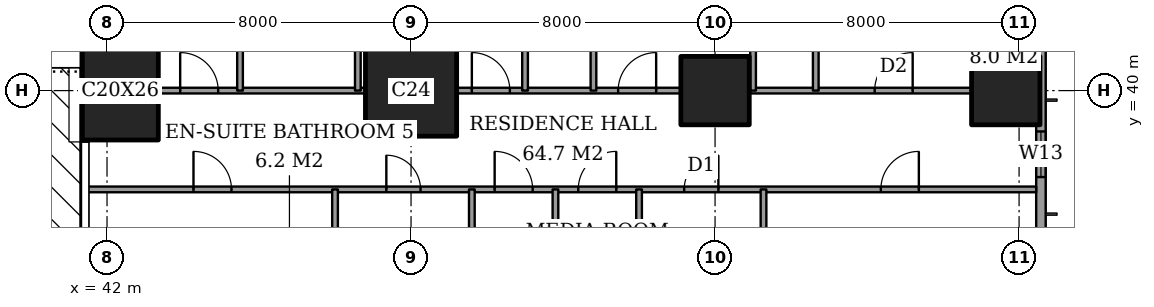
"""IFC4 building model, lengths in metres.
Left out: names, types, materials, properties, quantities, classifications, styles, units other than length and angle.
Written with IfcOpenShell. Run it as: python <this file> out.ifc"""

import sys

from ifc_helpers import new_model, si_unit, direction, frame, frame_2d, origin, origin_2d, place, context, subcontext, project, spatial, rectangle, extrude, element, fill, save


model = new_model("IFC4")
c1 = context("Model", 3, precision=1e-05, world=origin(), true_north=direction((0.0, 1.0)))
c2 = subcontext(c1, "Body", "Model", "MODEL_VIEW")
j1 = project(units=[si_unit("LENGTHUNIT", "METRE"), si_unit("PLANEANGLEUNIT", "RADIAN")], contexts=[c1])
p1 = place(None, origin())
s1 = spatial("IfcSite", under=j1, at=p1, CompositionType="ELEMENT")
p2 = place(p1, origin())
s2 = spatial("IfcBuilding", under=s1, at=p2, CompositionType="ELEMENT")
p3 = place(p2, frame((0.0, 0.0, 182.2)))
s3 = spatial("IfcBuildingStorey", under=s2, at=p3, CompositionType="ELEMENT", Elevation=182.2)
p4 = place(p3, frame((42.35, 40.0, 0.0), z_axis=(0.0, 0.0, 1.0), x_axis=(1.0, 0.0, 0.0)))
e1 = element("IfcColumn", 1, at=p4, inside=s3, PredefinedType="COLUMN", context=c2, shape_type="SweptSolid", body=[
    extrude(rectangle(XDim=2.0, YDim=2.6, at=origin_2d()), origin(), (0.0, 0.0, 1.0), 3.6),
])
p5 = place(p3, frame((50.0, 40.0, 0.0), z_axis=(0.0, 0.0, 1.0), x_axis=(1.0, 0.0, 0.0)))
e2 = element("IfcColumn", 2, at=p5, inside=s3, PredefinedType="COLUMN", context=c2, shape_type="SweptSolid", body=[
    extrude(rectangle(XDim=2.4, YDim=2.4, at=origin_2d()), origin(), (0.0, 0.0, 1.0), 3.6),
])
for number, where, z_axis, x_axis in (
    (3, (58.0, 40.0, 0.0), (0.0, 0.0, 1.0), (1.0, 0.0, 0.0)),
    (4, (65.65, 40.0, 0.0), (0.0, 0.0, 1.0), (1.0, 0.0, 0.0)),
):
    element("IfcColumn", number, at=place(p3, frame(where, z_axis=z_axis, x_axis=x_axis)), inside=s3, PredefinedType="COLUMN", context=c2, shape_type="SweptSolid", body=[
        extrude(rectangle(XDim=1.8, YDim=1.8, at=origin_2d()), origin(), (0.0, 0.0, 1.0), 3.6),
    ])
p6 = place(p3, frame((66.575, 3.175, 0.0), z_axis=(0.0, 0.0, 1.0), x_axis=(0.0, 1.0, 0.0)))
e5 = element("IfcWall", 5, at=p6, inside=s3, PredefinedType="SOLIDWALL", context=c2, shape_type="SweptSolid", body=[
    extrude(rectangle(XDim=41.65, YDim=0.25, at=frame_2d((20.825, 0.0))), origin(), (0.0, 0.0, 1.0), 3.6),
])
p7 = place(p6, frame((0.825, 0.0, 0.2)))
e6 = element("IfcOpeningElement", 6, at=p7, cuts=e5, PredefinedType="OPENING", context=c2, shape_type="SweptSolid", body=[
    extrude(rectangle(XDim=2.4, YDim=2.4, at=frame_2d((1.2, 1.2))), frame((0.0, 0.135, 0.0), z_axis=(0.0, -1.0, 0.0), x_axis=(1.0, 0.0, 0.0)), (0.0, 0.0, 1.0), 0.27),
])
p8 = place(p6, frame((6.6, 0.0, 0.2)))
e7 = element("IfcOpeningElement", 7, at=p8, cuts=e5, PredefinedType="OPENING", context=c2, shape_type="SweptSolid", body=[
    extrude(rectangle(XDim=1.2, YDim=2.4, at=frame_2d((0.6, 1.2))), frame((0.0, 0.135, 0.0), z_axis=(0.0, -1.0, 0.0), x_axis=(1.0, 0.0, 0.0)), (0.0, 0.0, 1.0), 0.27),
])
p9 = place(p6, frame((8.775, 0.0, 0.2)))
e8 = element("IfcOpeningElement", 8, at=p9, cuts=e5, PredefinedType="OPENING", context=c2, shape_type="SweptSolid", body=[
    extrude(rectangle(XDim=2.4, YDim=2.4, at=frame_2d((1.2, 1.2))), frame((0.0, 0.135, 0.0), z_axis=(0.0, -1.0, 0.0), x_axis=(1.0, 0.0, 0.0)), (0.0, 0.0, 1.0), 0.27),
])
p10 = place(p6, frame((15.675, 0.0, 0.2)))
e9 = element("IfcOpeningElement", 9, at=p10, cuts=e5, PredefinedType="OPENING", context=c2, shape_type="SweptSolid", body=[
    extrude(rectangle(XDim=2.4, YDim=2.4, at=frame_2d((1.2, 1.2))), frame((0.0, 0.135, 0.0), z_axis=(0.0, -1.0, 0.0), x_axis=(1.0, 0.0, 0.0)), (0.0, 0.0, 1.0), 0.27),
])
p11 = place(p6, frame((23.575, 0.0, 0.2)))
e10 = element("IfcOpeningElement", 10, at=p11, cuts=e5, PredefinedType="OPENING", context=c2, shape_type="SweptSolid", body=[
    extrude(rectangle(XDim=2.4, YDim=2.4, at=frame_2d((1.2, 1.2))), frame((0.0, 0.135, 0.0), z_axis=(0.0, -1.0, 0.0), x_axis=(1.0, 0.0, 0.0)), (0.0, 0.0, 1.0), 0.27),
])
p12 = place(p6, frame((30.775, 0.0, 0.2)))
e11 = element("IfcOpeningElement", 11, at=p12, cuts=e5, PredefinedType="OPENING", context=c2, shape_type="SweptSolid", body=[
    extrude(rectangle(XDim=2.4, YDim=2.4, at=frame_2d((1.2, 1.2))), frame((0.0, 0.135, 0.0), z_axis=(0.0, -1.0, 0.0), x_axis=(1.0, 0.0, 0.0)), (0.0, 0.0, 1.0), 0.27),
])
p13 = place(p6, frame((34.55, 0.0, 0.2)))
e12 = element("IfcOpeningElement", 12, at=p13, cuts=e5, PredefinedType="OPENING", context=c2, shape_type="SweptSolid", body=[
    extrude(rectangle(XDim=1.2, YDim=2.4, at=frame_2d((0.6, 1.2))), frame((0.0, 0.135, 0.0), z_axis=(0.0, -1.0, 0.0), x_axis=(1.0, 0.0, 0.0)), (0.0, 0.0, 1.0), 0.27),
])
p14 = place(p6, frame((38.425, 0.0, 0.2)))
e13 = element("IfcOpeningElement", 13, at=p14, cuts=e5, PredefinedType="OPENING", context=c2, shape_type="SweptSolid", body=[
    extrude(rectangle(XDim=2.4, YDim=2.4, at=frame_2d((1.2, 1.2))), frame((0.0, 0.135, 0.0), z_axis=(0.0, -1.0, 0.0), x_axis=(1.0, 0.0, 0.0)), (0.0, 0.0, 1.0), 0.27),
])
p15 = place(p3, frame((41.439, 37.4, 0.0), z_axis=(0.0, 0.0, 1.0), x_axis=(1.0, 0.0, 0.0)))
e14 = element("IfcWall", 14, at=p15, inside=s3, PredefinedType="PARTITIONING", context=c2, shape_type="SweptSolid", body=[
    extrude(rectangle(XDim=25.011, YDim=0.15, at=frame_2d((12.505, 0.0))), origin(), (0.0, 0.0, 1.0), 3.35),
])
p16 = place(p15, frame((10.761, 0.0, 0.0)))
e15 = element("IfcOpeningElement", 15, at=p16, cuts=e14, PredefinedType="OPENING", context=c2, shape_type="SweptSolid", body=[
    extrude(rectangle(XDim=1.0, YDim=2.1, at=frame_2d((0.5, 1.05))), frame((0.0, 0.085, 0.0), z_axis=(0.0, -1.0, 0.0), x_axis=(1.0, 0.0, 0.0)), (0.0, 0.0, 1.0), 0.17),
])
p17 = place(p15, frame((20.924, 0.0, 0.0)))
e16 = element("IfcOpeningElement", 16, at=p17, cuts=e14, PredefinedType="OPENING", context=c2, shape_type="SweptSolid", body=[
    extrude(rectangle(XDim=1.0, YDim=2.1, at=frame_2d((0.5, 1.05))), frame((0.0, 0.085, 0.0), z_axis=(0.0, -1.0, 0.0), x_axis=(1.0, 0.0, 0.0)), (0.0, 0.0, 1.0), 0.17),
])
p18 = place(p15, frame((15.749, 0.0, 0.0)))
e17 = element("IfcOpeningElement", 17, at=p18, cuts=e14, PredefinedType="OPENING", context=c2, shape_type="SweptSolid", body=[
    extrude(rectangle(XDim=0.9, YDim=2.1, at=frame_2d((0.45, 1.05))), frame((0.0, 0.085, 0.0), z_axis=(0.0, -1.0, 0.0), x_axis=(1.0, 0.0, 0.0)), (0.0, 0.0, 1.0), 0.17),
])
p19 = place(p15, frame((12.961, 0.0, 0.0)))
e18 = element("IfcOpeningElement", 18, at=p19, cuts=e14, PredefinedType="OPENING", context=c2, shape_type="SweptSolid", body=[
    extrude(rectangle(XDim=1.0, YDim=2.1, at=frame_2d((0.5, 1.05))), frame((0.0, 0.085, 0.0), z_axis=(0.0, -1.0, 0.0), x_axis=(1.0, 0.0, 0.0)), (0.0, 0.0, 1.0), 0.17),
])
p20 = place(p15, frame((7.911, 0.0, 0.0)))
e19 = element("IfcOpeningElement", 19, at=p20, cuts=e14, PredefinedType="OPENING", context=c2, shape_type="SweptSolid", body=[
    extrude(rectangle(XDim=0.9, YDim=2.1, at=frame_2d((0.45, 1.05))), frame((0.0, 0.085, 0.0), z_axis=(0.0, -1.0, 0.0), x_axis=(1.0, 0.0, 0.0)), (0.0, 0.0, 1.0), 0.17),
])
p21 = place(p15, frame((2.836, 0.0, 0.0)))
e20 = element("IfcOpeningElement", 20, at=p21, cuts=e14, PredefinedType="OPENING", context=c2, shape_type="SweptSolid", body=[
    extrude(rectangle(XDim=1.0, YDim=2.1, at=frame_2d((0.5, 1.05))), frame((0.0, 0.085, 0.0), z_axis=(0.0, -1.0, 0.0), x_axis=(1.0, 0.0, 0.0)), (0.0, 0.0, 1.0), 0.17),
])
p22 = place(p3, frame((43.35, 40.0, 0.0), z_axis=(0.0, 0.0, 1.0), x_axis=(1.0, 0.0, 0.0)))
e21 = element("IfcWall", 21, at=p22, inside=s3, PredefinedType="PARTITIONING", context=c2, shape_type="SweptSolid", body=[
    extrude(rectangle(XDim=5.45, YDim=0.15, at=frame_2d((2.725, 0.0))), origin(), (0.0, 0.0, 1.0), 3.35),
])
p23 = place(p22, frame((0.575, 0.0, 0.0)))
e22 = element("IfcOpeningElement", 22, at=p23, cuts=e21, PredefinedType="OPENING", context=c2, shape_type="SweptSolid", body=[
    extrude(rectangle(XDim=1.0, YDim=2.1, at=frame_2d((0.5, 1.05))), frame((0.0, 0.085, 0.0), z_axis=(0.0, -1.0, 0.0), x_axis=(1.0, 0.0, 0.0)), (0.0, 0.0, 1.0), 0.17),
])
p24 = place(p3, frame((51.2, 40.0, 0.0), z_axis=(0.0, 0.0, 1.0), x_axis=(1.0, 0.0, 0.0)))
e23 = element("IfcWall", 23, at=p24, inside=s3, PredefinedType="PARTITIONING", context=c2, shape_type="SweptSolid", body=[
    extrude(rectangle(XDim=5.9, YDim=0.15, at=frame_2d((2.95, 0.0))), origin(), (0.0, 0.0, 1.0), 3.35),
])
p25 = place(p24, frame((4.25, 0.0, 0.0)))
e24 = element("IfcOpeningElement", 24, at=p25, cuts=e23, PredefinedType="OPENING", context=c2, shape_type="SweptSolid", body=[
    extrude(rectangle(XDim=1.0, YDim=2.1, at=frame_2d((0.5, 1.05))), frame((0.0, 0.085, 0.0), z_axis=(0.0, -1.0, 0.0), x_axis=(1.0, 0.0, 0.0)), (0.0, 0.0, 1.0), 0.17),
])
p26 = place(p24, frame((0.4, 0.0, 0.0)))
e25 = element("IfcOpeningElement", 25, at=p26, cuts=e23, PredefinedType="OPENING", context=c2, shape_type="SweptSolid", body=[
    extrude(rectangle(XDim=1.0, YDim=2.1, at=frame_2d((0.5, 1.05))), frame((0.0, 0.085, 0.0), z_axis=(0.0, -1.0, 0.0), x_axis=(1.0, 0.0, 0.0)), (0.0, 0.0, 1.0), 0.17),
])
p27 = place(p3, frame((58.9, 40.0, 0.0), z_axis=(0.0, 0.0, 1.0), x_axis=(1.0, 0.0, 0.0)))
e26 = element("IfcWall", 26, at=p27, inside=s3, PredefinedType="PARTITIONING", context=c2, shape_type="SweptSolid", body=[
    extrude(rectangle(XDim=5.85, YDim=0.15, at=frame_2d((2.925, 0.0))), origin(), (0.0, 0.0, 1.0), 3.35),
])
p28 = place(p27, frame((3.3, 0.0, 0.0)))
e27 = element("IfcOpeningElement", 27, at=p28, cuts=e26, PredefinedType="OPENING", context=c2, shape_type="SweptSolid", body=[
    extrude(rectangle(XDim=1.0, YDim=2.1, at=frame_2d((0.5, 1.05))), frame((0.0, 0.085, 0.0), z_axis=(0.0, -1.0, 0.0), x_axis=(1.0, 0.0, 0.0)), (0.0, 0.0, 1.0), 0.17),
])
p29 = place(p3, frame((45.5, 40.0, 0.0), z_axis=(0.0, 0.0, 1.0), x_axis=(0.0, 1.0, 0.0)))
e28 = element("IfcWall", 28, at=p29, inside=s3, PredefinedType="PARTITIONING", context=c2, shape_type="SweptSolid", body=[
    extrude(rectangle(XDim=8.45, YDim=0.15, at=frame_2d((4.225, 0.0))), origin(), (0.0, 0.0, 1.0), 3.35),
])
p30 = place(p3, frame((48.0, 28.0, 0.0), z_axis=(0.0, 0.0, 1.0), x_axis=(0.0, 1.0, 0.0)))
e29 = element("IfcWall", 29, at=p30, inside=s3, PredefinedType="PARTITIONING", context=c2, shape_type="SweptSolid", body=[
    extrude(rectangle(XDim=9.4, YDim=0.15, at=frame_2d((4.7, 0.0))), origin(), (0.0, 0.0, 1.0), 3.35),
])
p31 = place(p30, frame((0.5, 0.0, 0.0)))
e30 = element("IfcOpeningElement", 30, at=p31, cuts=e29, PredefinedType="OPENING", context=c2, shape_type="SweptSolid", body=[
    extrude(rectangle(XDim=1.0, YDim=2.1, at=frame_2d((0.5, 1.05))), frame((0.0, 0.085, 0.0), z_axis=(0.0, -1.0, 0.0), x_axis=(1.0, 0.0, 0.0)), (0.0, 0.0, 1.0), 0.17),
])
p32 = place(p3, frame((48.6, 40.0, 0.0), z_axis=(0.0, 0.0, 1.0), x_axis=(0.0, 1.0, 0.0)))
e31 = element("IfcWall", 31, at=p32, inside=s3, PredefinedType="PARTITIONING", context=c2, shape_type="SweptSolid", body=[
    extrude(rectangle(XDim=8.45, YDim=0.15, at=frame_2d((4.225, 0.0))), origin(), (0.0, 0.0, 1.0), 3.35),
])
p33 = place(p32, frame((3.775, 0.0, 0.0)))
e32 = element("IfcOpeningElement", 32, at=p33, cuts=e31, PredefinedType="OPENING", context=c2, shape_type="SweptSolid", body=[
    extrude(rectangle(XDim=0.9, YDim=2.1, at=frame_2d((0.45, 1.05))), frame((0.0, 0.085, 0.0), z_axis=(0.0, -1.0, 0.0), x_axis=(1.0, 0.0, 0.0)), (0.0, 0.0, 1.0), 0.17),
])
p34 = place(p3, frame((51.6, 30.0, 0.0), z_axis=(0.0, 0.0, 1.0), x_axis=(0.0, 1.0, 0.0)))
e33 = element("IfcWall", 33, at=p34, inside=s3, PredefinedType="PARTITIONING", context=c2, shape_type="SweptSolid", body=[
    extrude(rectangle(XDim=7.4, YDim=0.15, at=frame_2d((3.7, 0.0))), origin(), (0.0, 0.0, 1.0), 3.35),
])
p35 = place(p3, frame((53.0, 40.0, 0.0), z_axis=(0.0, 0.0, 1.0), x_axis=(0.0, 1.0, 0.0)))
e34 = element("IfcWall", 34, at=p35, inside=s3, PredefinedType="PARTITIONING", context=c2, shape_type="SweptSolid", body=[
    extrude(rectangle(XDim=8.45, YDim=0.15, at=frame_2d((4.225, 0.0))), origin(), (0.0, 0.0, 1.0), 3.35),
])
p36 = place(p3, frame((53.8, 30.0, 0.0), z_axis=(0.0, 0.0, 1.0), x_axis=(0.0, 1.0, 0.0)))
e35 = element("IfcWall", 35, at=p36, inside=s3, PredefinedType="PARTITIONING", context=c2, shape_type="SweptSolid", body=[
    extrude(rectangle(XDim=7.4, YDim=0.15, at=frame_2d((3.7, 0.0))), origin(), (0.0, 0.0, 1.0), 3.35),
])
p37 = place(p3, frame((54.8, 40.0, 0.0), z_axis=(0.0, 0.0, 1.0), x_axis=(0.0, 1.0, 0.0)))
e36 = element("IfcWall", 36, at=p37, inside=s3, PredefinedType="PARTITIONING", context=c2, shape_type="SweptSolid", body=[
    extrude(rectangle(XDim=8.45, YDim=0.15, at=frame_2d((4.225, 0.0))), origin(), (0.0, 0.0, 1.0), 3.35),
])
p38 = place(p37, frame((3.775, 0.0, 0.0)))
e37 = element("IfcOpeningElement", 37, at=p38, cuts=e36, PredefinedType="OPENING", context=c2, shape_type="SweptSolid", body=[
    extrude(rectangle(XDim=0.9, YDim=2.1, at=frame_2d((0.45, 1.05))), frame((0.0, 0.085, 0.0), z_axis=(0.0, -1.0, 0.0), x_axis=(1.0, 0.0, 0.0)), (0.0, 0.0, 1.0), 0.17),
])
p39 = place(p3, frame((56.0, 28.0, 0.0), z_axis=(0.0, 0.0, 1.0), x_axis=(0.0, 1.0, 0.0)))
e38 = element("IfcWall", 38, at=p39, inside=s3, PredefinedType="PARTITIONING", context=c2, shape_type="SweptSolid", body=[
    extrude(rectangle(XDim=9.4, YDim=0.15, at=frame_2d((4.7, 0.0))), origin(), (0.0, 0.0, 1.0), 3.35),
])
p40 = place(p39, frame((0.5, 0.0, 0.0)))
e39 = element("IfcOpeningElement", 39, at=p40, cuts=e38, PredefinedType="OPENING", context=c2, shape_type="SweptSolid", body=[
    extrude(rectangle(XDim=1.0, YDim=2.1, at=frame_2d((0.5, 1.05))), frame((0.0, 0.085, 0.0), z_axis=(0.0, -1.0, 0.0), x_axis=(1.0, 0.0, 0.0)), (0.0, 0.0, 1.0), 0.17),
])
p41 = place(p3, frame((59.0, 40.0, 0.0), z_axis=(0.0, 0.0, 1.0), x_axis=(0.0, 1.0, 0.0)))
e40 = element("IfcWall", 40, at=p41, inside=s3, PredefinedType="PARTITIONING", context=c2, shape_type="SweptSolid", body=[
    extrude(rectangle(XDim=8.45, YDim=0.15, at=frame_2d((4.225, 0.0))), origin(), (0.0, 0.0, 1.0), 3.35),
])
p42 = place(p3, frame((59.275, 33.2, 0.0), z_axis=(0.0, 0.0, 1.0), x_axis=(0.0, 1.0, 0.0)))
e41 = element("IfcWall", 41, at=p42, inside=s3, PredefinedType="PARTITIONING", context=c2, shape_type="SweptSolid", body=[
    extrude(rectangle(XDim=4.2, YDim=0.15, at=frame_2d((2.1, 0.0))), origin(), (0.0, 0.0, 1.0), 3.35),
])
p43 = place(p3, frame((60.65, 40.0, 0.0), z_axis=(0.0, 0.0, 1.0), x_axis=(0.0, 1.0, 0.0)))
e42 = element("IfcWall", 42, at=p43, inside=s3, PredefinedType="PARTITIONING", context=c2, shape_type="SweptSolid", body=[
    extrude(rectangle(XDim=8.45, YDim=0.15, at=frame_2d((4.225, 0.0))), origin(), (0.0, 0.0, 1.0), 3.35),
])
p44 = place(p43, frame((3.775, 0.0, 0.0)))
e43 = element("IfcOpeningElement", 43, at=p44, cuts=e42, PredefinedType="OPENING", context=c2, shape_type="SweptSolid", body=[
    extrude(rectangle(XDim=0.9, YDim=2.1, at=frame_2d((0.45, 1.05))), frame((0.0, 0.085, 0.0), z_axis=(0.0, -1.0, 0.0), x_axis=(1.0, 0.0, 0.0)), (0.0, 0.0, 1.0), 0.17),
])
p45 = place(p3, frame((64.75, 40.9, 0.0), z_axis=(0.0, 0.0, 1.0), x_axis=(0.0, 1.0, 0.0)))
e44 = element("IfcWall", 44, at=p45, inside=s3, PredefinedType="PARTITIONING", context=c2, shape_type="SweptSolid", body=[
    extrude(rectangle(XDim=3.8, YDim=0.15, at=frame_2d((1.9, 0.0))), origin(), (0.0, 0.0, 1.0), 3.35),
])
p46 = place(p45, frame((1.45, 0.0, 0.0)))
e45 = element("IfcOpeningElement", 45, at=p46, cuts=e44, PredefinedType="OPENING", context=c2, shape_type="SweptSolid", body=[
    extrude(rectangle(XDim=0.9, YDim=2.1, at=frame_2d((0.45, 1.05))), frame((0.0, 0.085, 0.0), z_axis=(0.0, -1.0, 0.0), x_axis=(1.0, 0.0, 0.0)), (0.0, 0.0, 1.0), 0.17),
])
p47 = place(p13, origin())
e46 = element("IfcWindow", 46, at=p47, inside=s3, PartitioningType="SINGLE_PANEL", PredefinedType="WINDOW", context=c2, shape_type="SweptSolid", body=[
    extrude(rectangle(XDim=1.2, YDim=2.4, at=frame_2d((0.6, 1.2))), frame((0.0, 0.03, 0.0), z_axis=(0.0, -1.0, 0.0), x_axis=(1.0, 0.0, 0.0)), (0.0, 0.0, 1.0), 0.06),
])
fill(e12, e46)
p48 = place(p28, origin())
e47 = element("IfcDoor", 47, at=p48, inside=s3, OperationType="SINGLE_SWING_LEFT", PredefinedType="DOOR", context=c2, shape_type="SweptSolid", body=[
    extrude(rectangle(XDim=1.0, YDim=2.1, at=frame_2d((0.5, 1.05))), frame((0.0, 0.025, 0.0), z_axis=(0.0, -1.0, 0.0), x_axis=(1.0, 0.0, 0.0)), (0.0, 0.0, 1.0), 0.05),
])
fill(e27, e47)
p49 = place(p25, origin())
e48 = element("IfcDoor", 48, at=p49, inside=s3, OperationType="SINGLE_SWING_LEFT", PredefinedType="DOOR", context=c2, shape_type="SweptSolid", body=[
    extrude(rectangle(XDim=1.0, YDim=2.1, at=frame_2d((0.5, 1.05))), frame((0.0, 0.025, 0.0), z_axis=(0.0, -1.0, 0.0), x_axis=(1.0, 0.0, 0.0)), (0.0, 0.0, 1.0), 0.05),
])
fill(e24, e48)
p50 = place(p26, origin())
e49 = element("IfcDoor", 49, at=p50, inside=s3, OperationType="SINGLE_SWING_RIGHT", PredefinedType="DOOR", context=c2, shape_type="SweptSolid", body=[
    extrude(rectangle(XDim=1.0, YDim=2.1, at=frame_2d((0.5, 1.05))), frame((0.0, 0.025, 0.0), z_axis=(0.0, -1.0, 0.0), x_axis=(1.0, 0.0, 0.0)), (0.0, 0.0, 1.0), 0.05),
])
fill(e25, e49)
p51 = place(p23, origin())
e50 = element("IfcDoor", 50, at=p51, inside=s3, OperationType="SINGLE_SWING_RIGHT", PredefinedType="DOOR", context=c2, shape_type="SweptSolid", body=[
    extrude(rectangle(XDim=1.0, YDim=2.1, at=frame_2d((0.5, 1.05))), frame((0.0, 0.025, 0.0), z_axis=(0.0, -1.0, 0.0), x_axis=(1.0, 0.0, 0.0)), (0.0, 0.0, 1.0), 0.05),
])
fill(e22, e50)
p52 = place(p16, origin())
e51 = element("IfcDoor", 51, at=p52, inside=s3, OperationType="SINGLE_SWING_RIGHT", PredefinedType="DOOR", context=c2, shape_type="SweptSolid", body=[
    extrude(rectangle(XDim=1.0, YDim=2.1, at=frame_2d((0.5, 1.05))), frame((0.0, 0.025, 0.0), z_axis=(0.0, -1.0, 0.0), x_axis=(1.0, 0.0, 0.0)), (0.0, 0.0, 1.0), 0.05),
])
fill(e15, e51)
p53 = place(p17, origin())
e52 = element("IfcDoor", 52, at=p53, inside=s3, OperationType="SINGLE_SWING_LEFT", PredefinedType="DOOR", context=c2, shape_type="SweptSolid", body=[
    extrude(rectangle(XDim=1.0, YDim=2.1, at=frame_2d((0.5, 1.05))), frame((0.0, 0.025, 0.0), z_axis=(0.0, -1.0, 0.0), x_axis=(1.0, 0.0, 0.0)), (0.0, 0.0, 1.0), 0.05),
])
fill(e16, e52)
p54 = place(p18, origin())
e53 = element("IfcDoor", 53, at=p54, inside=s3, OperationType="SINGLE_SWING_LEFT", PredefinedType="DOOR", context=c2, shape_type="SweptSolid", body=[
    extrude(rectangle(XDim=0.9, YDim=2.1, at=frame_2d((0.45, 1.05))), frame((0.0, 0.025, 0.0), z_axis=(0.0, -1.0, 0.0), x_axis=(1.0, 0.0, 0.0)), (0.0, 0.0, 1.0), 0.05),
])
fill(e17, e53)
p55 = place(p19, origin())
e54 = element("IfcDoor", 54, at=p55, inside=s3, OperationType="SINGLE_SWING_LEFT", PredefinedType="DOOR", context=c2, shape_type="SweptSolid", body=[
    extrude(rectangle(XDim=1.0, YDim=2.1, at=frame_2d((0.5, 1.05))), frame((0.0, 0.025, 0.0), z_axis=(0.0, -1.0, 0.0), x_axis=(1.0, 0.0, 0.0)), (0.0, 0.0, 1.0), 0.05),
])
fill(e18, e54)
p56 = place(p20, origin())
e55 = element("IfcDoor", 55, at=p56, inside=s3, OperationType="SINGLE_SWING_RIGHT", PredefinedType="DOOR", context=c2, shape_type="SweptSolid", body=[
    extrude(rectangle(XDim=0.9, YDim=2.1, at=frame_2d((0.45, 1.05))), frame((0.0, 0.025, 0.0), z_axis=(0.0, -1.0, 0.0), x_axis=(1.0, 0.0, 0.0)), (0.0, 0.0, 1.0), 0.05),
])
fill(e19, e55)
p57 = place(p21, origin())
e56 = element("IfcDoor", 56, at=p57, inside=s3, OperationType="SINGLE_SWING_RIGHT", PredefinedType="DOOR", context=c2, shape_type="SweptSolid", body=[
    extrude(rectangle(XDim=1.0, YDim=2.1, at=frame_2d((0.5, 1.05))), frame((0.0, 0.025, 0.0), z_axis=(0.0, -1.0, 0.0), x_axis=(1.0, 0.0, 0.0)), (0.0, 0.0, 1.0), 0.05),
])
fill(e20, e56)
save(model, sys.argv[1])
